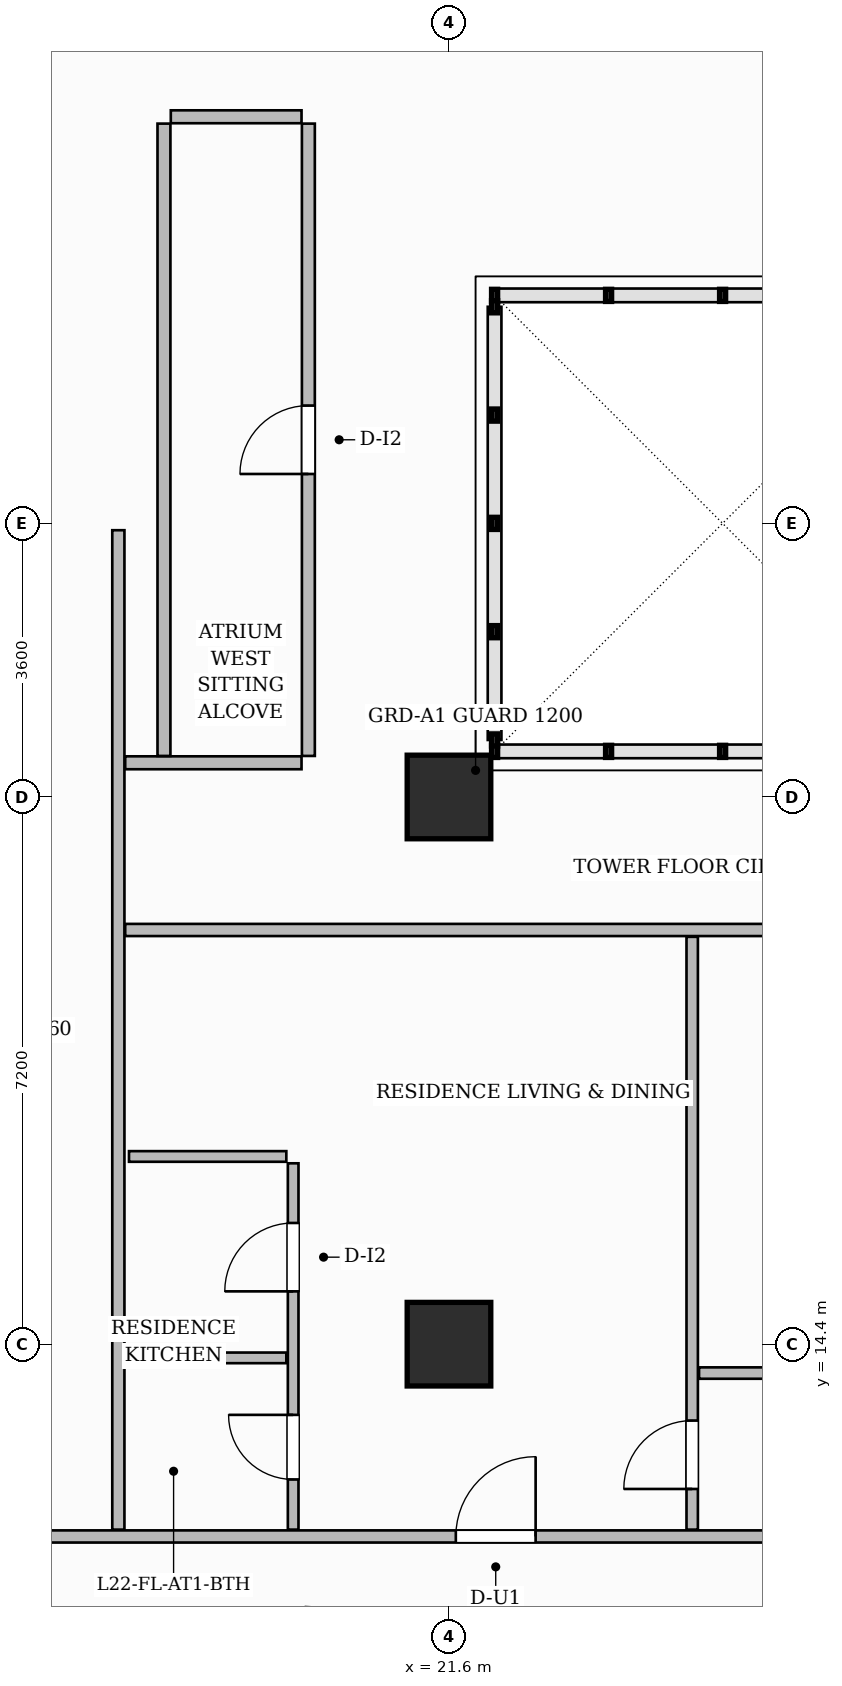
"""IFC4 building model, lengths in metres.
Left out: names, types, materials, properties, quantities, classifications, styles, units other than length and angle.
Written with IfcOpenShell. Run it as: python <this file> out.ifc"""

import sys

from ifc_helpers import new_model, si_unit, direction, frame, frame_2d, origin, origin_2d, place, context, subcontext, project, spatial, rectangle, extrude, source, transform, mapped, element, fill, save


model = new_model("IFC4")
c1 = context("Model", 3, precision=1e-05, world=origin(), true_north=direction((0.0, 1.0)))
c2 = subcontext(c1, "Body", "Model", "MODEL_VIEW")
j1 = project(units=[si_unit("LENGTHUNIT", "METRE"), si_unit("PLANEANGLEUNIT", "RADIAN")], contexts=[c1])
p1 = place(None, origin())
s1 = spatial("IfcSite", under=j1, at=p1, CompositionType="ELEMENT")
p2 = place(p1, origin())
s2 = spatial("IfcBuilding", under=s1, at=p2, CompositionType="ELEMENT")
p3 = place(p2, frame((0.0, 0.0, 91.6)))
s3 = spatial("IfcBuildingStorey", under=s2, at=p3, CompositionType="ELEMENT", Elevation=91.6)
m1 = source(origin(), c2, "Body", "SweptSolid", [
    extrude(rectangle(XDim=1.1, YDim=1.1, at=origin_2d()), origin(), (0.0, 0.0, 1.0), 3.7),
])
for number, where, z_axis, x_axis in (
    (1, (21.6, 14.4, 0.0), (0.0, 0.0, 1.0), (1.0, 0.0, 0.0)),
    (2, (21.6, 21.6, 0.0), (0.0, 0.0, 1.0), (1.0, 0.0, 0.0)),
):
    element("IfcColumn", number, at=place(p3, frame(where, z_axis=z_axis, x_axis=x_axis)), inside=s3, PredefinedType="COLUMN", context=c2, shape_type="MappedRepresentation", body=[
        mapped(m1, transform((0.0, 0.0, 0.0), scale=1.0)),
    ])
p4 = place(p3, frame((14.568, 11.87, 0.0), z_axis=(0.0, 0.0, 1.0), x_axis=(1.0, 0.0, 0.0)))
e3 = element("IfcWall", 3, at=p4, inside=s3, PredefinedType="PARTITIONING", context=c2, shape_type="SweptSolid", body=[
    extrude(rectangle(XDim=15.542, YDim=0.16, at=frame_2d((7.771, 0.0))), origin(), (0.0, 0.0, 1.0), 3.45),
])
p5 = place(p4, frame((7.122, 0.0, 0.0)))
e4 = element("IfcOpeningElement", 4, at=p5, cuts=e3, PredefinedType="OPENING", context=c2, shape_type="SweptSolid", body=[
    extrude(rectangle(XDim=1.05, YDim=2.25, at=frame_2d((0.525, 1.125))), frame((0.0, 0.09, 0.0), z_axis=(0.0, -1.0, 0.0), x_axis=(1.0, 0.0, 0.0)), (0.0, 0.0, 1.0), 0.18),
])
p6 = place(p3, frame((17.25, 11.96, 0.0), z_axis=(0.0, 0.0, 1.0), x_axis=(0.0, 1.0, 0.0)))
e5 = element("IfcWall", 5, at=p6, inside=s3, PredefinedType="PARTITIONING", context=c2, shape_type="SweptSolid", body=[
    extrude(rectangle(XDim=13.15, YDim=0.16, at=frame_2d((6.575, 0.0))), origin(), (0.0, 0.0, 1.0), 3.45),
])
p7 = place(p3, frame((17.34, 22.05, 0.0), z_axis=(0.0, 0.0, 1.0), x_axis=(1.0, 0.0, 0.0)))
e6 = element("IfcWall", 6, at=p7, inside=s3, PredefinedType="PARTITIONING", context=c2, shape_type="SweptSolid", body=[
    extrude(rectangle(XDim=2.32, YDim=0.17, at=frame_2d((1.16, 0.0))), origin(), (0.0, 0.0, 1.0), 3.45),
])
p8 = place(p3, frame((17.94, 30.55, 0.0), z_axis=(0.0, 0.0, 1.0), x_axis=(1.0, 0.0, 0.0)))
e7 = element("IfcWall", 7, at=p8, inside=s3, PredefinedType="PARTITIONING", context=c2, shape_type="SweptSolid", body=[
    extrude(rectangle(XDim=1.72, YDim=0.17, at=frame_2d((0.86, 0.0))), origin(), (0.0, 0.0, 1.0), 3.45),
])
p9 = place(p3, frame((17.85, 22.14, 0.0), z_axis=(0.0, 0.0, 1.0), x_axis=(0.0, 1.0, 0.0)))
e8 = element("IfcWall", 8, at=p9, inside=s3, PredefinedType="PARTITIONING", context=c2, shape_type="SweptSolid", body=[
    extrude(rectangle(XDim=8.32, YDim=0.17, at=frame_2d((4.16, 0.0))), origin(), (0.0, 0.0, 1.0), 3.45),
])
p10 = place(p3, frame((19.75, 22.14, 0.0), z_axis=(0.0, 0.0, 1.0), x_axis=(0.0, 1.0, 0.0)))
e9 = element("IfcWall", 9, at=p10, inside=s3, PredefinedType="PARTITIONING", context=c2, shape_type="SweptSolid", body=[
    extrude(rectangle(XDim=8.32, YDim=0.17, at=frame_2d((4.16, 0.0))), origin(), (0.0, 0.0, 1.0), 3.45),
])
p11 = place(p10, frame((3.71, 0.0, 0.0)))
e10 = element("IfcOpeningElement", 10, at=p11, cuts=e9, PredefinedType="OPENING", context=c2, shape_type="SweptSolid", body=[
    extrude(rectangle(XDim=0.9, YDim=2.15, at=frame_2d((0.45, 1.075))), frame((0.0, 0.095, 0.0), z_axis=(0.0, -1.0, 0.0), x_axis=(1.0, 0.0, 0.0)), (0.0, 0.0, 1.0), 0.19),
])
p12 = place(p3, frame((17.34, 19.85, 0.0), z_axis=(0.0, 0.0, 1.0), x_axis=(1.0, 0.0, 0.0)))
e11 = element("IfcWall", 11, at=p12, inside=s3, PredefinedType="PARTITIONING", context=c2, shape_type="SweptSolid", body=[
    extrude(rectangle(XDim=10.92, YDim=0.16, at=frame_2d((5.46, 0.0))), origin(), (0.0, 0.0, 1.0), 3.45),
])
p13 = place(p3, frame((19.55, 11.96, 0.0), z_axis=(0.0, 0.0, 1.0), x_axis=(0.0, 1.0, 0.0)))
e12 = element("IfcWall", 12, at=p13, inside=s3, PredefinedType="PARTITIONING", context=c2, shape_type="SweptSolid", body=[
    extrude(rectangle(XDim=4.82, YDim=0.14, at=frame_2d((2.41, 0.0))), origin(), (0.0, 0.0, 1.0), 3.45),
])
p14 = place(p13, frame((0.66, 0.0, 0.0)))
e13 = element("IfcOpeningElement", 13, at=p14, cuts=e12, PredefinedType="OPENING", context=c2, shape_type="SweptSolid", body=[
    extrude(rectangle(XDim=0.85, YDim=2.1, at=frame_2d((0.425, 1.05))), frame((0.0, 0.08, 0.0), z_axis=(0.0, -1.0, 0.0), x_axis=(1.0, 0.0, 0.0)), (0.0, 0.0, 1.0), 0.16),
])
p15 = place(p13, frame((3.135, 0.0, 0.0)))
e14 = element("IfcOpeningElement", 14, at=p15, cuts=e12, PredefinedType="OPENING", context=c2, shape_type="SweptSolid", body=[
    extrude(rectangle(XDim=0.9, YDim=2.15, at=frame_2d((0.45, 1.075))), frame((0.0, 0.08, 0.0), z_axis=(0.0, -1.0, 0.0), x_axis=(1.0, 0.0, 0.0)), (0.0, 0.0, 1.0), 0.16),
])
p16 = place(p3, frame((17.39, 14.22, 0.0), z_axis=(0.0, 0.0, 1.0), x_axis=(1.0, 0.0, 0.0)))
e15 = element("IfcWall", 15, at=p16, inside=s3, PredefinedType="PARTITIONING", context=c2, shape_type="SweptSolid", body=[
    extrude(rectangle(XDim=2.07, YDim=0.14, at=frame_2d((1.035, 0.0))), origin(), (0.0, 0.0, 1.0), 2.885),
])
p17 = place(p3, frame((17.39, 16.87, 0.0), z_axis=(0.0, 0.0, 1.0), x_axis=(1.0, 0.0, 0.0)))
e16 = element("IfcWall", 16, at=p17, inside=s3, PredefinedType="PARTITIONING", context=c2, shape_type="SweptSolid", body=[
    extrude(rectangle(XDim=2.07, YDim=0.14, at=frame_2d((1.035, 0.0))), origin(), (0.0, 0.0, 1.0), 3.45),
])
p18 = place(p3, frame((24.8, 11.96, 0.0), z_axis=(0.0, 0.0, 1.0), x_axis=(0.0, 1.0, 0.0)))
e17 = element("IfcWall", 17, at=p18, inside=s3, PredefinedType="PARTITIONING", context=c2, shape_type="SweptSolid", body=[
    extrude(rectangle(XDim=7.8, YDim=0.15, at=frame_2d((3.9, 0.0))), origin(), (0.0, 0.0, 1.0), 3.45),
])
p19 = place(p18, frame((0.535, 0.0, 0.0)))
e18 = element("IfcOpeningElement", 18, at=p19, cuts=e17, PredefinedType="OPENING", context=c2, shape_type="SweptSolid", body=[
    extrude(rectangle(XDim=0.9, YDim=2.15, at=frame_2d((0.45, 1.075))), frame((0.0, 0.085, 0.0), z_axis=(0.0, -1.0, 0.0), x_axis=(1.0, 0.0, 0.0)), (0.0, 0.0, 1.0), 0.17),
])
p20 = place(p3, frame((24.89, 14.02, 0.0), z_axis=(0.0, 0.0, 1.0), x_axis=(1.0, 0.0, 0.0)))
e19 = element("IfcWall", 19, at=p20, inside=s3, PredefinedType="PARTITIONING", context=c2, shape_type="SweptSolid", body=[
    extrude(rectangle(XDim=5.22, YDim=0.15, at=frame_2d((2.61, 0.0))), origin(), (0.0, 0.0, 1.0), 3.45),
])
p21 = place(p20, frame((1.11, 0.0, 0.0)))
e20 = element("IfcOpeningElement", 20, at=p21, cuts=e19, PredefinedType="OPENING", context=c2, shape_type="SweptSolid", body=[
    extrude(rectangle(XDim=0.9, YDim=2.15, at=frame_2d((0.45, 1.075))), frame((0.0, 0.085, 0.0), z_axis=(0.0, -1.0, 0.0), x_axis=(1.0, 0.0, 0.0)), (0.0, 0.0, 1.0), 0.17),
])
m2 = source(origin(), c2, "Body", "SweptSolid", [
    extrude(rectangle(XDim=0.9, YDim=2.15, at=frame_2d((0.45, 1.075))), frame((0.0, 0.025, 0.0), z_axis=(0.0, -1.0, 0.0), x_axis=(1.0, 0.0, 0.0)), (0.0, 0.0, 1.0), 0.05),
])
p22 = place(p11, origin())
e21 = element("IfcDoor", 21, at=p22, inside=s3, OperationType="SINGLE_SWING_LEFT", PredefinedType="DOOR", context=c2, shape_type="MappedRepresentation", body=[
    mapped(m2, transform((0.0, 0.0, 0.0), scale=1.0)),
])
fill(e10, e21)
m3 = source(origin(), c2, "Body", "SweptSolid", [
    extrude(rectangle(XDim=0.85, YDim=2.1, at=frame_2d((0.425, 1.05))), frame((0.0, 0.025, 0.0), z_axis=(0.0, -1.0, 0.0), x_axis=(1.0, 0.0, 0.0)), (0.0, 0.0, 1.0), 0.05),
])
p23 = place(p14, origin())
e22 = element("IfcDoor", 22, at=p23, inside=s3, OperationType="SINGLE_SWING_RIGHT", PredefinedType="DOOR", context=c2, shape_type="MappedRepresentation", body=[
    mapped(m3, transform((0.0, 0.0, 0.0), scale=1.0)),
])
fill(e13, e22)
p24 = place(p15, origin())
e23 = element("IfcDoor", 23, at=p24, inside=s3, OperationType="SINGLE_SWING_LEFT", PredefinedType="DOOR", context=c2, shape_type="MappedRepresentation", body=[
    mapped(m2, transform((0.0, 0.0, 0.0), scale=1.0)),
])
fill(e14, e23)
m4 = source(origin(), c2, "Body", "SweptSolid", [
    extrude(rectangle(XDim=1.05, YDim=2.25, at=frame_2d((0.525, 1.125))), frame((0.0, 0.025, 0.0), z_axis=(0.0, -1.0, 0.0), x_axis=(1.0, 0.0, 0.0)), (0.0, 0.0, 1.0), 0.05),
])
p25 = place(p5, origin())
e24 = element("IfcDoor", 24, at=p25, inside=s3, OperationType="SINGLE_SWING_RIGHT", PredefinedType="DOOR", context=c2, shape_type="MappedRepresentation", body=[
    mapped(m4, transform((0.0, 0.0, 0.0), scale=1.0)),
])
fill(e4, e24)
p26 = place(p19, origin())
e25 = element("IfcDoor", 25, at=p26, inside=s3, OperationType="SINGLE_SWING_LEFT", PredefinedType="DOOR", context=c2, shape_type="MappedRepresentation", body=[
    mapped(m2, transform((0.0, 0.0, 0.0), scale=1.0)),
])
fill(e18, e25)
save(model, sys.argv[1])
